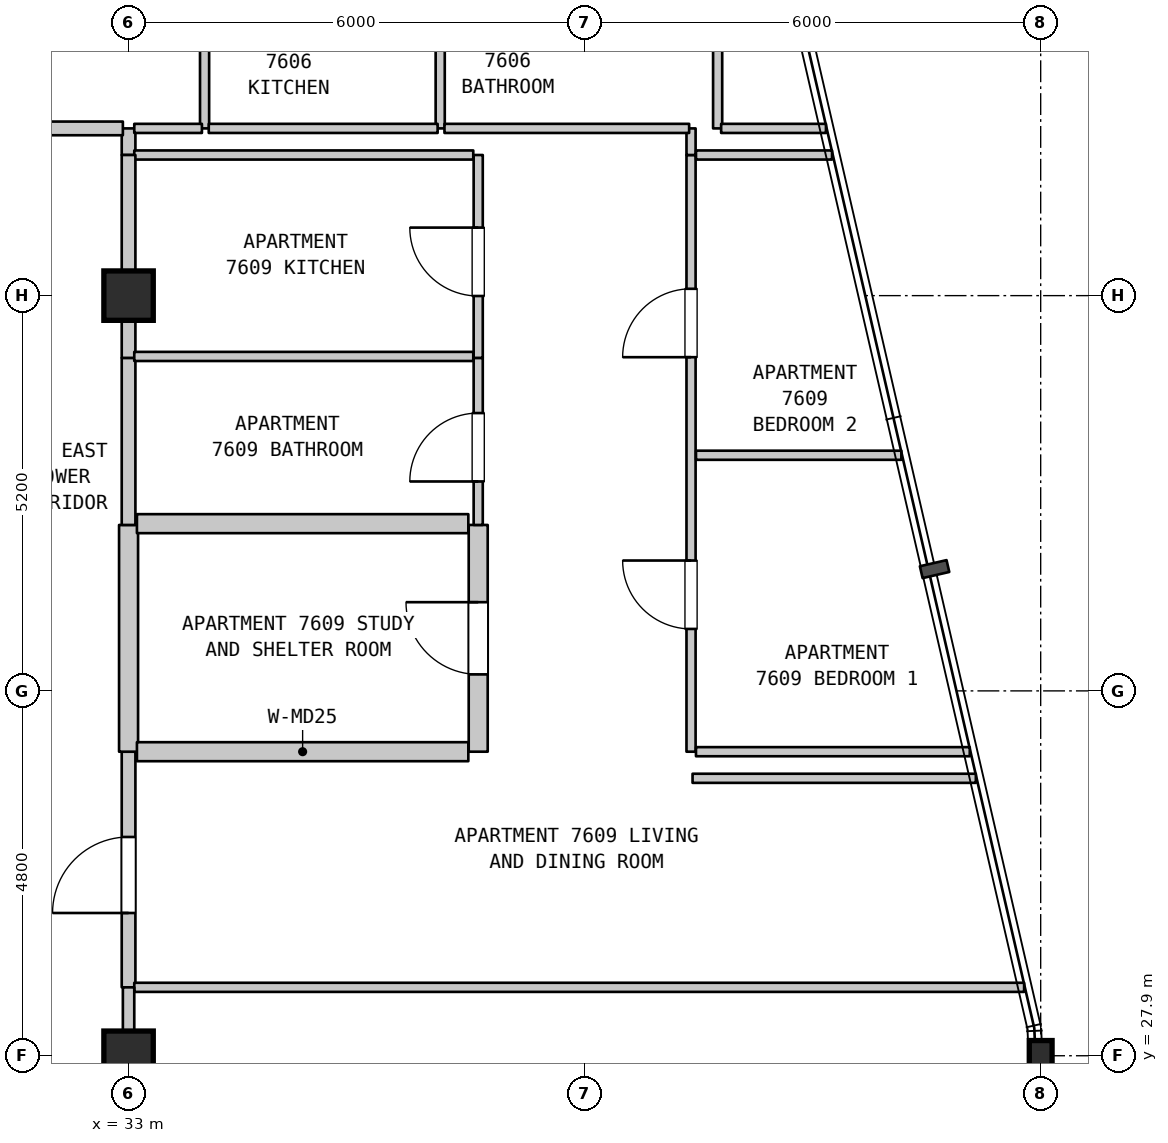
"""IFC4 building model, lengths in metres.
Left out: names, types, materials, properties, quantities, classifications, styles, units other than length and angle.
Written with IfcOpenShell. Run it as: python <this file> out.ifc"""

import sys

from ifc_helpers import new_model, si_unit, direction, frame, frame_2d, origin, origin_2d, place, context, subcontext, project, spatial, rectangle, i_section, extrude, element, fill, save


model = new_model("IFC4")
c1 = context("Model", 3, precision=1e-05, world=origin(), true_north=direction((0.0, 1.0)))
c2 = subcontext(c1, "Body", "Model", "MODEL_VIEW")
j1 = project(units=[si_unit("LENGTHUNIT", "METRE"), si_unit("PLANEANGLEUNIT", "RADIAN")], contexts=[c1])
p1 = place(None, origin())
s1 = spatial("IfcSite", under=j1, at=p1, CompositionType="ELEMENT")
p2 = place(p1, origin())
s2 = spatial("IfcBuilding", under=s1, at=p2, CompositionType="ELEMENT")
p3 = place(p2, frame((0.0, 0.0, 303.6)))
s3 = spatial("IfcBuildingStorey", under=s2, at=p3, CompositionType="ELEMENT", Elevation=303.6)
for number, where, z_axis, x_axis in (
    (1, (33.0, 27.9, 0.0), (0.0, 0.0, 1.0), (1.0, 0.0, 0.0)),
    (2, (33.0, 37.9, 0.0), (0.0, 0.0, 1.0), (1.0, 0.0, 0.0)),
):
    element("IfcColumn", number, at=place(p3, frame(where, z_axis=z_axis, x_axis=x_axis)), inside=s3, PredefinedType="COLUMN", context=c2, shape_type="SweptSolid", body=[
        extrude(rectangle(XDim=0.65, YDim=0.65, at=origin_2d()), origin(), (0.0, 0.0, 1.0), 3.7),
    ])
p4 = place(p3, frame((45.0, 27.9, 0.0), z_axis=(0.0, 0.0, 1.0), x_axis=(1.0, 0.0, 0.0)))
e3 = element("IfcColumn", 3, at=p4, inside=s3, PredefinedType="COLUMN", context=c2, shape_type="SweptSolid", body=[
    extrude(i_section(OverallWidth=0.3, OverallDepth=0.4, WebThickness=0.013, FlangeThickness=0.024, FilletRadius=0.027, at=origin_2d()), origin(), (0.0, 0.0, 1.0), 3.7),
])
p5 = place(p3, frame((33.0, 19.5, 0.0), z_axis=(0.0, 0.0, 1.0), x_axis=(0.0, 1.0, 0.0)))
e4 = element("IfcWall", 4, at=p5, inside=s3, PredefinedType="STANDARD", context=c2, shape_type="SweptSolid", body=[
    extrude(rectangle(XDim=8.4, YDim=0.15, at=frame_2d((4.2, 0.0))), origin(), (0.0, 0.0, 1.0), 3.1),
])
p6 = place(p5, frame((4.079, 0.0, 0.0)))
e5 = element("IfcOpeningElement", 5, at=p6, cuts=e4, PredefinedType="OPENING", context=c2, shape_type="SweptSolid", body=[
    extrude(rectangle(XDim=1.0, YDim=2.15, at=frame_2d((0.5, 1.075))), frame((0.0, 0.085, 0.0), z_axis=(0.0, -1.0, 0.0), x_axis=(1.0, 0.0, 0.0)), (0.0, 0.0, 1.0), 0.17),
])
p7 = place(p3, frame((33.0, 28.8, 0.0), z_axis=(0.0, 0.0, 1.0), x_axis=(0.0, 1.0, 0.0)))
e6 = element("IfcWall", 6, at=p7, inside=s3, PredefinedType="STANDARD", context=c2, shape_type="SweptSolid", body=[
    extrude(rectangle(XDim=3.1, YDim=0.18, at=frame_2d((1.55, 0.0))), origin(), (0.0, 0.0, 1.0), 2.89),
])
p8 = place(p7, frame((0.978, 0.0, 0.0)))
e7 = element("IfcOpeningElement", 7, at=p8, cuts=e6, PredefinedType="OPENING", context=c2, shape_type="SweptSolid", body=[
    extrude(rectangle(XDim=1.0, YDim=2.15, at=frame_2d((0.5, 1.075))), frame((0.0, 0.1, 0.0), z_axis=(0.0, -1.0, 0.0), x_axis=(1.0, 0.0, 0.0)), (0.0, 0.0, 1.0), 0.2),
])
p9 = place(p3, frame((33.0, 31.9, 0.0), z_axis=(0.0, 0.0, 1.0), x_axis=(0.0, 1.0, 0.0)))
e8 = element("IfcWall", 8, at=p9, inside=s3, PredefinedType="STANDARD", context=c2, shape_type="SweptSolid", body=[
    extrude(rectangle(XDim=2.983, YDim=0.25, at=frame_2d((1.492, 0.0))), origin(), (0.0, 0.0, 1.0), 2.89),
])
p10 = place(p3, frame((33.0, 34.883, 0.0), z_axis=(0.0, 0.0, 1.0), x_axis=(0.0, 1.0, 0.0)))
e9 = element("IfcWall", 9, at=p10, inside=s3, PredefinedType="STANDARD", context=c2, shape_type="SweptSolid", body=[
    extrude(rectangle(XDim=2.198, YDim=0.18, at=frame_2d((1.099, 0.0))), origin(), (0.0, 0.0, 1.0), 2.89),
])
p11 = place(p3, frame((33.0, 37.081, 0.0), z_axis=(0.0, 0.0, 1.0), x_axis=(0.0, 1.0, 0.0)))
e10 = element("IfcWall", 10, at=p11, inside=s3, PredefinedType="STANDARD", context=c2, shape_type="SweptSolid", body=[
    extrude(rectangle(XDim=0.819, YDim=0.18, at=frame_2d((0.409, 0.0))), origin(), (0.0, 0.0, 1.0), 2.89),
])
p12 = place(p3, frame((33.0, 39.75, 0.0), z_axis=(0.0, 0.0, 1.0), x_axis=(0.0, 1.0, 0.0)))
e11 = element("IfcWall", 11, at=p12, inside=s3, PredefinedType="STANDARD", context=c2, shape_type="SweptSolid", body=[
    extrude(rectangle(XDim=0.35, YDim=0.18, at=frame_2d((0.175, 0.0))), origin(), (0.0, 0.0, 1.0), 3.39),
])
for number, where, z_axis, x_axis in (
    (12, (34.0, 40.1, 0.0), (0.0, 0.0, 1.0), (0.0, 1.0, 0.0)),
    (13, (37.1, 40.1, 0.0), (0.0, 0.0, 1.0), (0.0, 1.0, 0.0)),
):
    element("IfcWall", number, at=place(p3, frame(where, z_axis=z_axis, x_axis=x_axis)), inside=s3, PredefinedType="PARTITIONING", context=c2, shape_type="SweptSolid", body=[
        extrude(rectangle(XDim=2.3, YDim=0.12, at=frame_2d((1.15, 0.0))), origin(), (0.0, 0.0, 1.0), 3.39),
    ])
p13 = place(p3, frame((37.6, 31.9, 0.0), z_axis=(0.0, 0.0, 1.0), x_axis=(0.0, 1.0, 0.0)))
e14 = element("IfcWall", 14, at=p13, inside=s3, PredefinedType="STANDARD", context=c2, shape_type="SweptSolid", body=[
    extrude(rectangle(XDim=2.983, YDim=0.25, at=frame_2d((1.492, 0.0))), origin(), (0.0, 0.0, 1.0), 3.39),
])
p14 = place(p13, frame((1.017, 0.0, 0.0)))
e15 = element("IfcOpeningElement", 15, at=p14, cuts=e14, PredefinedType="OPENING", context=c2, shape_type="SweptSolid", body=[
    extrude(rectangle(XDim=0.95, YDim=2.15, at=frame_2d((0.475, 1.075))), frame((0.0, 0.135, 0.0), z_axis=(0.0, -1.0, 0.0), x_axis=(1.0, 0.0, 0.0)), (0.0, 0.0, 1.0), 0.27),
])
p15 = place(p3, frame((37.6, 34.883, 0.0), z_axis=(0.0, 0.0, 1.0), x_axis=(0.0, 1.0, 0.0)))
e16 = element("IfcWall", 16, at=p15, inside=s3, PredefinedType="PARTITIONING", context=c2, shape_type="SweptSolid", body=[
    extrude(rectangle(XDim=2.198, YDim=0.12, at=frame_2d((1.099, 0.0))), origin(), (0.0, 0.0, 1.0), 3.39),
])
p16 = place(p15, frame((0.572, 0.0, 0.0)))
e17 = element("IfcOpeningElement", 17, at=p16, cuts=e16, PredefinedType="OPENING", context=c2, shape_type="SweptSolid", body=[
    extrude(rectangle(XDim=0.9, YDim=2.1, at=frame_2d((0.45, 1.05))), frame((0.0, 0.07, 0.0), z_axis=(0.0, -1.0, 0.0), x_axis=(1.0, 0.0, 0.0)), (0.0, 0.0, 1.0), 0.14),
])
p17 = place(p3, frame((37.6, 37.081, 0.0), z_axis=(0.0, 0.0, 1.0), x_axis=(0.0, 1.0, 0.0)))
e18 = element("IfcWall", 18, at=p17, inside=s3, PredefinedType="PARTITIONING", context=c2, shape_type="SweptSolid", body=[
    extrude(rectangle(XDim=2.669, YDim=0.12, at=frame_2d((1.334, 0.0))), origin(), (0.0, 0.0, 1.0), 3.39),
])
p18 = place(p17, frame((0.814, 0.0, 0.0)))
e19 = element("IfcOpeningElement", 19, at=p18, cuts=e18, PredefinedType="OPENING", context=c2, shape_type="SweptSolid", body=[
    extrude(rectangle(XDim=0.9, YDim=2.15, at=frame_2d((0.45, 1.075))), frame((0.0, 0.07, 0.0), z_axis=(0.0, -1.0, 0.0), x_axis=(1.0, 0.0, 0.0)), (0.0, 0.0, 1.0), 0.14),
])
p19 = place(p3, frame((40.4, 31.9, 0.0), z_axis=(0.0, 0.0, 1.0), x_axis=(0.0, 1.0, 0.0)))
e20 = element("IfcWall", 20, at=p19, inside=s3, PredefinedType="PARTITIONING", context=c2, shape_type="SweptSolid", body=[
    extrude(rectangle(XDim=7.85, YDim=0.12, at=frame_2d((3.925, 0.0))), origin(), (0.0, 0.0, 1.0), 3.39),
])
p20 = place(p19, frame((1.615, 0.0, 0.0)))
e21 = element("IfcOpeningElement", 21, at=p20, cuts=e20, PredefinedType="OPENING", context=c2, shape_type="SweptSolid", body=[
    extrude(rectangle(XDim=0.9, YDim=2.15, at=frame_2d((0.45, 1.075))), frame((0.0, 0.07, 0.0), z_axis=(0.0, -1.0, 0.0), x_axis=(1.0, 0.0, 0.0)), (0.0, 0.0, 1.0), 0.14),
])
p21 = place(p19, frame((5.19, 0.0, 0.0)))
e22 = element("IfcOpeningElement", 22, at=p21, cuts=e20, PredefinedType="OPENING", context=c2, shape_type="SweptSolid", body=[
    extrude(rectangle(XDim=0.9, YDim=2.15, at=frame_2d((0.45, 1.075))), frame((0.0, 0.07, 0.0), z_axis=(0.0, -1.0, 0.0), x_axis=(1.0, 0.0, 0.0)), (0.0, 0.0, 1.0), 0.14),
])
p22 = place(p3, frame((40.4, 39.75, 0.0), z_axis=(0.0, 0.0, 1.0), x_axis=(0.0, 1.0, 0.0)))
e23 = element("IfcWall", 23, at=p22, inside=s3, PredefinedType="PARTITIONING", context=c2, shape_type="SweptSolid", body=[
    extrude(rectangle(XDim=0.35, YDim=0.12, at=frame_2d((0.175, 0.0))), origin(), (0.0, 0.0, 1.0), 3.39),
])
p23 = place(p3, frame((40.75, 40.1, 0.0), z_axis=(0.0, 0.0, 1.0), x_axis=(0.0, 1.0, 0.0)))
e24 = element("IfcWall", 24, at=p23, inside=s3, PredefinedType="PARTITIONING", context=c2, shape_type="SweptSolid", body=[
    extrude(rectangle(XDim=2.3, YDim=0.12, at=frame_2d((1.15, 0.0))), origin(), (0.0, 0.0, 1.0), 3.39),
])
p24 = place(p3, frame((33.075, 28.8, 0.0), z_axis=(0.0, 0.0, 1.0), x_axis=(1.0, 0.0, 0.0)))
e25 = element("IfcWall", 25, at=p24, inside=s3, PredefinedType="PARTITIONING", context=c2, shape_type="SweptSolid", body=[
    extrude(rectangle(XDim=11.707, YDim=0.12, at=frame_2d((5.854, 0.0))), origin(), (0.0, 0.0, 1.0), 3.39),
])
p25 = place(p3, frame((40.42, 31.55, 0.0), z_axis=(0.0, 0.0, 1.0), x_axis=(1.0, 0.0, 0.0)))
e26 = element("IfcWall", 26, at=p25, inside=s3, PredefinedType="PARTITIONING", context=c2, shape_type="SweptSolid", body=[
    extrude(rectangle(XDim=3.727, YDim=0.12, at=frame_2d((1.864, 0.0))), origin(), (0.0, 0.0, 1.0), 3.39),
])
p26 = place(p3, frame((33.11, 31.9, 0.0), z_axis=(0.0, 0.0, 1.0), x_axis=(1.0, 0.0, 0.0)))
e27 = element("IfcWall", 27, at=p26, inside=s3, PredefinedType="STANDARD", context=c2, shape_type="SweptSolid", body=[
    extrude(rectangle(XDim=4.36, YDim=0.25, at=frame_2d((2.18, 0.0))), origin(), (0.0, 0.0, 1.0), 3.39),
])
p27 = place(p3, frame((40.465, 31.9, 0.0), z_axis=(0.0, 0.0, 1.0), x_axis=(1.0, 0.0, 0.0)))
e28 = element("IfcWall", 28, at=p27, inside=s3, PredefinedType="PARTITIONING", context=c2, shape_type="SweptSolid", body=[
    extrude(rectangle(XDim=3.602, YDim=0.12, at=frame_2d((1.801, 0.0))), origin(), (0.0, 0.0, 1.0), 3.39),
])
p28 = place(p3, frame((33.11, 34.9, 0.0), z_axis=(0.0, 0.0, 1.0), x_axis=(1.0, 0.0, 0.0)))
e29 = element("IfcWall", 29, at=p28, inside=s3, PredefinedType="STANDARD", context=c2, shape_type="SweptSolid", body=[
    extrude(rectangle(XDim=4.36, YDim=0.25, at=frame_2d((2.18, 0.0))), origin(), (0.0, 0.0, 1.0), 3.39),
])
p29 = place(p3, frame((40.465, 35.8, 0.0), z_axis=(0.0, 0.0, 1.0), x_axis=(1.0, 0.0, 0.0)))
e30 = element("IfcWall", 30, at=p29, inside=s3, PredefinedType="PARTITIONING", context=c2, shape_type="SweptSolid", body=[
    extrude(rectangle(XDim=2.702, YDim=0.12, at=frame_2d((1.351, 0.0))), origin(), (0.0, 0.0, 1.0), 3.39),
])
for number, where, z_axis, x_axis in (
    (31, (33.075, 37.1, 0.0), (0.0, 0.0, 1.0), (1.0, 0.0, 0.0)),
    (32, (33.075, 39.75, 0.0), (0.0, 0.0, 1.0), (1.0, 0.0, 0.0)),
):
    element("IfcWall", number, at=place(p3, frame(where, z_axis=z_axis, x_axis=x_axis)), inside=s3, PredefinedType="PARTITIONING", context=c2, shape_type="SweptSolid", body=[
        extrude(rectangle(XDim=4.46, YDim=0.12, at=frame_2d((2.23, 0.0))), origin(), (0.0, 0.0, 1.0), 3.39),
    ])
p30 = place(p3, frame((40.465, 39.75, 0.0), z_axis=(0.0, 0.0, 1.0), x_axis=(1.0, 0.0, 0.0)))
e33 = element("IfcWall", 33, at=p30, inside=s3, PredefinedType="PARTITIONING", context=c2, shape_type="SweptSolid", body=[
    extrude(rectangle(XDim=1.79, YDim=0.12, at=frame_2d((0.895, 0.0))), origin(), (0.0, 0.0, 1.0), 3.39),
])
p31 = place(p3, frame((28.595, 40.1, 0.0), z_axis=(0.0, 0.0, 1.0), x_axis=(1.0, 0.0, 0.0)))
e34 = element("IfcWall", 34, at=p31, inside=s3, PredefinedType="STANDARD", context=c2, shape_type="SweptSolid", body=[
    extrude(rectangle(XDim=4.33, YDim=0.18, at=frame_2d((2.165, 0.0))), origin(), (0.0, 0.0, 1.0), 3.39),
])
p32 = place(p31, frame((1.88, 0.0, 0.0)))
e35 = element("IfcOpeningElement", 35, at=p32, cuts=e34, PredefinedType="OPENING", context=c2, shape_type="SweptSolid", body=[
    extrude(rectangle(XDim=1.0, YDim=2.15, at=frame_2d((0.5, 1.075))), frame((0.0, 0.1, 0.0), z_axis=(0.0, -1.0, 0.0), x_axis=(1.0, 0.0, 0.0)), (0.0, 0.0, 1.0), 0.2),
])
p33 = place(p3, frame((33.075, 40.1, 0.0), z_axis=(0.0, 0.0, 1.0), x_axis=(1.0, 0.0, 0.0)))
e36 = element("IfcWall", 36, at=p33, inside=s3, PredefinedType="PARTITIONING", context=c2, shape_type="SweptSolid", body=[
    extrude(rectangle(XDim=0.89, YDim=0.12, at=frame_2d((0.445, 0.0))), origin(), (0.0, 0.0, 1.0), 3.39),
])
p34 = place(p3, frame((34.055, 40.1, 0.0), z_axis=(0.0, 0.0, 1.0), x_axis=(1.0, 0.0, 0.0)))
e37 = element("IfcWall", 37, at=p34, inside=s3, PredefinedType="PARTITIONING", context=c2, shape_type="SweptSolid", body=[
    extrude(rectangle(XDim=3.011, YDim=0.12, at=frame_2d((1.505, 0.0))), origin(), (0.0, 0.0, 1.0), 3.39),
])
p35 = place(p3, frame((37.156, 40.1, 0.0), z_axis=(0.0, 0.0, 1.0), x_axis=(1.0, 0.0, 0.0)))
e38 = element("IfcWall", 38, at=p35, inside=s3, PredefinedType="PARTITIONING", context=c2, shape_type="SweptSolid", body=[
    extrude(rectangle(XDim=3.219, YDim=0.12, at=frame_2d((1.609, 0.0))), origin(), (0.0, 0.0, 1.0), 3.39),
])
p36 = place(p3, frame((40.796, 40.1, 0.0), z_axis=(0.0, 0.0, 1.0), x_axis=(1.0, 0.0, 0.0)))
e39 = element("IfcWall", 39, at=p36, inside=s3, PredefinedType="PARTITIONING", context=c2, shape_type="SweptSolid", body=[
    extrude(rectangle(XDim=1.379, YDim=0.12, at=frame_2d((0.689, 0.0))), origin(), (0.0, 0.0, 1.0), 3.39),
])
p37 = place(p3, frame((33.0, 27.9, 0.0), z_axis=(0.0, 0.0, 1.0), x_axis=(0.0, 1.0, 0.0)))
e40 = element("IfcWall", 40, at=p37, inside=s3, PredefinedType="STANDARD", context=c2, shape_type="SweptSolid", body=[
    extrude(rectangle(XDim=0.9, YDim=0.15, at=frame_2d((0.45, 0.0))), origin(), (0.0, 0.0, 1.0), 2.89),
])
p38 = place(p3, frame((33.0, 37.9, 0.0), z_axis=(0.0, 0.0, 1.0), x_axis=(0.0, 1.0, 0.0)))
e41 = element("IfcWall", 41, at=p38, inside=s3, PredefinedType="STANDARD", context=c2, shape_type="SweptSolid", body=[
    extrude(rectangle(XDim=1.85, YDim=0.18, at=frame_2d((0.925, 0.0))), origin(), (0.0, 0.0, 1.0), 2.79),
])
p39 = place(p8, origin())
e42 = element("IfcDoor", 42, at=p39, inside=s3, OperationType="SINGLE_SWING_LEFT", PredefinedType="DOOR", context=c2, shape_type="SweptSolid", body=[
    extrude(rectangle(XDim=1.0, YDim=2.15, at=frame_2d((0.5, 1.075))), frame((0.0, 0.025, 0.0), z_axis=(0.0, -1.0, 0.0), x_axis=(1.0, 0.0, 0.0)), (0.0, 0.0, 1.0), 0.05),
])
fill(e7, e42)
p40 = place(p14, origin())
e43 = element("IfcDoor", 43, at=p40, inside=s3, OperationType="SINGLE_SWING_RIGHT", PredefinedType="DOOR", context=c2, shape_type="SweptSolid", body=[
    extrude(rectangle(XDim=0.95, YDim=2.15, at=frame_2d((0.475, 1.075))), frame((0.0, 0.025, 0.0), z_axis=(0.0, -1.0, 0.0), x_axis=(1.0, 0.0, 0.0)), (0.0, 0.0, 1.0), 0.05),
])
fill(e15, e43)
p41 = place(p16, origin())
e44 = element("IfcDoor", 44, at=p41, inside=s3, OperationType="SINGLE_SWING_LEFT", PredefinedType="DOOR", context=c2, shape_type="SweptSolid", body=[
    extrude(rectangle(XDim=0.9, YDim=2.1, at=frame_2d((0.45, 1.05))), frame((0.0, 0.025, 0.0), z_axis=(0.0, -1.0, 0.0), x_axis=(1.0, 0.0, 0.0)), (0.0, 0.0, 1.0), 0.05),
])
fill(e17, e44)
p42 = place(p18, origin())
e45 = element("IfcDoor", 45, at=p42, inside=s3, OperationType="SINGLE_SWING_RIGHT", PredefinedType="DOOR", context=c2, shape_type="SweptSolid", body=[
    extrude(rectangle(XDim=0.9, YDim=2.15, at=frame_2d((0.45, 1.075))), frame((0.0, 0.025, 0.0), z_axis=(0.0, -1.0, 0.0), x_axis=(1.0, 0.0, 0.0)), (0.0, 0.0, 1.0), 0.05),
])
fill(e19, e45)
p43 = place(p20, origin())
e46 = element("IfcDoor", 46, at=p43, inside=s3, OperationType="SINGLE_SWING_RIGHT", PredefinedType="DOOR", context=c2, shape_type="SweptSolid", body=[
    extrude(rectangle(XDim=0.9, YDim=2.15, at=frame_2d((0.45, 1.075))), frame((0.0, 0.025, 0.0), z_axis=(0.0, -1.0, 0.0), x_axis=(1.0, 0.0, 0.0)), (0.0, 0.0, 1.0), 0.05),
])
fill(e21, e46)
p44 = place(p21, origin())
e47 = element("IfcDoor", 47, at=p44, inside=s3, OperationType="SINGLE_SWING_LEFT", PredefinedType="DOOR", context=c2, shape_type="SweptSolid", body=[
    extrude(rectangle(XDim=0.9, YDim=2.15, at=frame_2d((0.45, 1.075))), frame((0.0, 0.025, 0.0), z_axis=(0.0, -1.0, 0.0), x_axis=(1.0, 0.0, 0.0)), (0.0, 0.0, 1.0), 0.05),
])
fill(e22, e47)
save(model, sys.argv[1])
